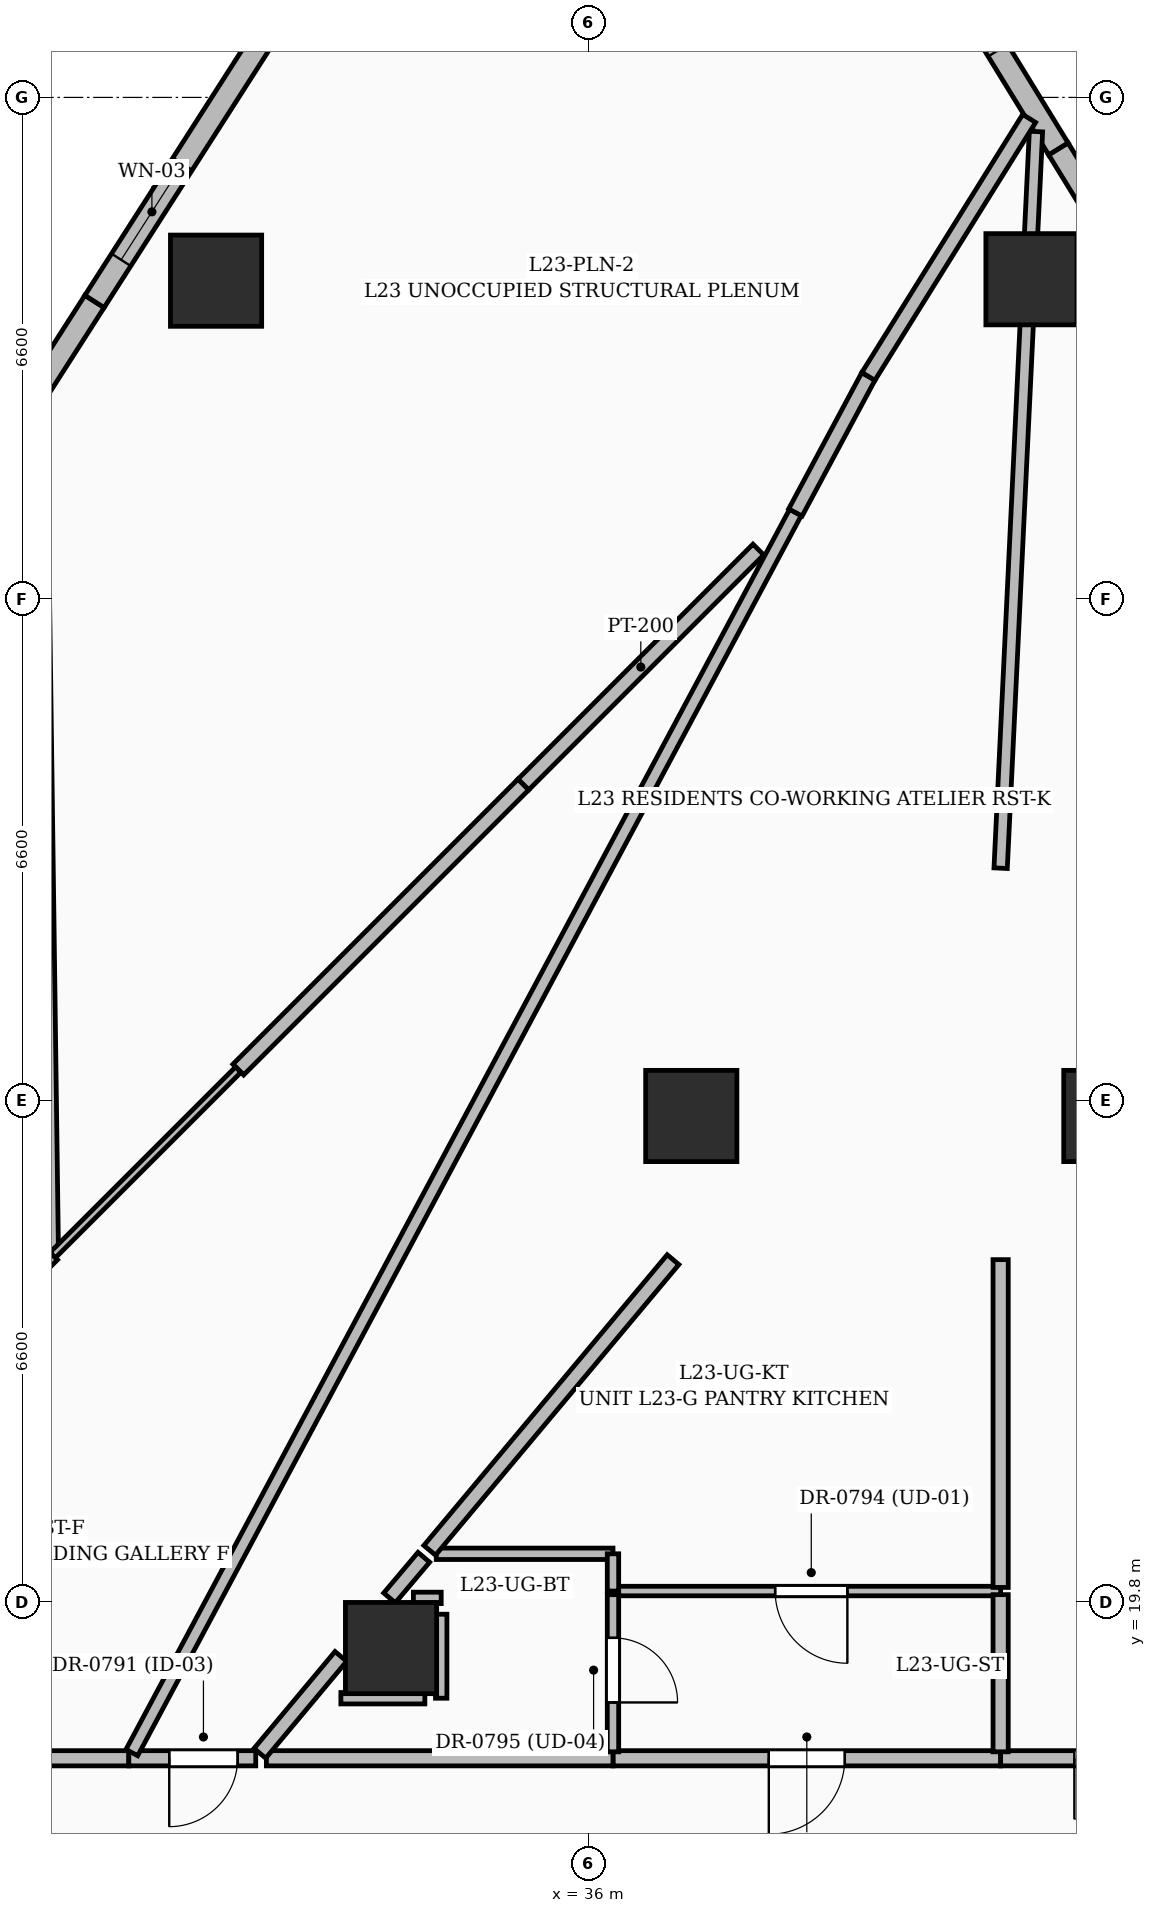
"""IFC4 building model, lengths in metres.
Left out: names, types, materials, properties, quantities, classifications, styles, units other than length and angle.
Written with IfcOpenShell. Run it as: python <this file> out.ifc"""

import sys

from ifc_helpers import new_model, si_unit, direction, frame, frame_2d, origin, origin_2d, place, context, subcontext, project, spatial, rectangle, extrude, element, fill, save


model = new_model("IFC4")
c1 = context("Model", 3, precision=1e-05, world=origin(), true_north=direction((0.0, 1.0)))
c2 = subcontext(c1, "Body", "Model", "MODEL_VIEW")
j1 = project(units=[si_unit("LENGTHUNIT", "METRE"), si_unit("PLANEANGLEUNIT", "RADIAN")], contexts=[c1])
p1 = place(None, origin())
s1 = spatial("IfcSite", under=j1, at=p1, CompositionType="ELEMENT")
p2 = place(p1, origin())
s2 = spatial("IfcBuilding", under=s1, at=p2, CompositionType="ELEMENT")
p3 = place(p2, frame((0.0, 0.0, 93.0)))
s3 = spatial("IfcBuildingStorey", under=s2, at=p3, CompositionType="ELEMENT", Elevation=93.0)
for number, where, z_axis, x_axis in (
    (1, (42.85, 26.2, 0.0), (0.0, 0.0, 1.0), (1.0, 0.0, 0.0)),
    (2, (37.35, 26.2, 0.0), (0.0, 0.0, 1.0), (1.0, 0.0, 0.0)),
    (3, (33.4, 19.2, 0.0), (0.0, 0.0, 1.0), (1.0, 0.0, 0.0)),
    (4, (41.826, 37.208, 0.0), (0.0, 0.0, 1.0), (1.0, 0.0, 0.0)),
    (5, (31.098, 37.189, 0.0), (0.0, 0.0, 1.0), (1.0, 0.0, 0.0)),
):
    element("IfcColumn", number, at=place(p3, frame(where, z_axis=z_axis, x_axis=x_axis)), inside=s3, PredefinedType="COLUMN", context=c2, shape_type="SweptSolid", body=[
        extrude(rectangle(XDim=1.2, YDim=1.2, at=origin_2d()), origin(), (0.0, 0.0, 1.0), 3.6),
    ])
p4 = place(p3, frame((25.202, 30.21, 0.0), z_axis=(0.0, 0.0, 1.0), x_axis=(0.53945551692, 0.842014100395, 0.0)))
e6 = element("IfcWall", 6, at=p4, inside=s3, PredefinedType="SOLIDWALL", context=c2, shape_type="SweptSolid", body=[
    extrude(rectangle(XDim=7.964, YDim=0.3, at=frame_2d((3.982, 0.0))), origin(), (0.0, 0.0, 1.0), 3.35),
])
p5 = place(p4, frame((2.35, 0.0, 0.55)))
e7 = element("IfcOpeningElement", 7, at=p5, cuts=e6, PredefinedType="OPENING", context=c2, shape_type="SweptSolid", body=[
    extrude(rectangle(XDim=1.6, YDim=2.2, at=frame_2d((0.8, 1.1))), frame((0.0, 0.16, 0.0), z_axis=(0.0, -1.0, 0.0), x_axis=(1.0, 0.0, 0.0)), (0.0, 0.0, 1.0), 0.32),
])
p6 = place(p3, frame((29.499, 36.916, 0.0), z_axis=(0.0, 0.0, 1.0), x_axis=(0.539433782812, 0.842028024451, 0.0)))
e8 = element("IfcWall", 8, at=p6, inside=s3, PredefinedType="SOLIDWALL", context=c2, shape_type="SweptSolid", body=[
    extrude(rectangle(XDim=7.964, YDim=0.3, at=frame_2d((3.982, 0.0))), origin(), (0.0, 0.0, 1.0), 3.35),
])
p7 = place(p6, frame((0.65, 0.0, 0.6)))
e9 = element("IfcOpeningElement", 9, at=p7, cuts=e8, PredefinedType="OPENING", context=c2, shape_type="SweptSolid", body=[
    extrude(rectangle(XDim=1.5, YDim=2.1, at=frame_2d((0.75, 1.05))), frame((0.0, 0.16, 0.0), z_axis=(0.0, -1.0, 0.0), x_axis=(1.0, 0.0, 0.0)), (0.0, 0.0, 1.0), 0.32),
])
p8 = place(p6, frame((4.65, 0.0, 0.6)))
e10 = element("IfcOpeningElement", 10, at=p8, cuts=e8, PredefinedType="OPENING", context=c2, shape_type="SweptSolid", body=[
    extrude(rectangle(XDim=1.5, YDim=2.1, at=frame_2d((0.75, 1.05))), frame((0.0, 0.16, 0.0), z_axis=(0.0, -1.0, 0.0), x_axis=(1.0, 0.0, 0.0)), (0.0, 0.0, 1.0), 0.32),
])
p9 = place(p3, frame((39.54, 43.217, 0.0), z_axis=(0.0, 0.0, 1.0), x_axis=(0.52373802156, -0.851879383935, 0.0)))
e11 = element("IfcWall", 11, at=p9, inside=s3, PredefinedType="SOLIDWALL", context=c2, shape_type="SweptSolid", body=[
    extrude(rectangle(XDim=5.042, YDim=0.3, at=frame_2d((2.521, 0.0))), origin(), (0.0, 0.0, 1.0), 3.35),
])
p10 = place(p9, frame((1.92, 0.0, 0.55)))
e12 = element("IfcOpeningElement", 12, at=p10, cuts=e11, PredefinedType="OPENING", context=c2, shape_type="SweptSolid", body=[
    extrude(rectangle(XDim=1.6, YDim=2.2, at=frame_2d((0.8, 1.1))), frame((0.0, 0.16, 0.0), z_axis=(0.0, -1.0, 0.0), x_axis=(1.0, 0.0, 0.0)), (0.0, 0.0, 1.0), 0.32),
])
p11 = place(p3, frame((42.181, 38.922, 0.0), z_axis=(0.0, 0.0, 1.0), x_axis=(0.523678708762, -0.851915846777, 0.0)))
e13 = element("IfcWall", 13, at=p11, inside=s3, PredefinedType="SOLIDWALL", context=c2, shape_type="SweptSolid", body=[
    extrude(rectangle(XDim=5.596, YDim=0.3, at=frame_2d((2.798, 0.0))), origin(), (0.0, 0.0, 1.0), 3.35),
])
p12 = place(p11, frame((2.025, 0.0, 0.6)))
e14 = element("IfcOpeningElement", 14, at=p12, cuts=e13, PredefinedType="OPENING", context=c2, shape_type="SweptSolid", body=[
    extrude(rectangle(XDim=1.5, YDim=2.1, at=frame_2d((0.75, 1.05))), frame((0.0, 0.16, 0.0), z_axis=(0.0, -1.0, 0.0), x_axis=(1.0, 0.0, 0.0)), (0.0, 0.0, 1.0), 0.32),
])
p13 = place(p3, frame((29.95, 17.75, 0.0), z_axis=(0.0, 0.0, 1.0), x_axis=(-1.0, 0.0, 0.0)))
e15 = element("IfcWall", 15, at=p13, inside=s3, PredefinedType="PARTITIONING", context=c2, shape_type="SweptSolid", body=[
    extrude(rectangle(XDim=7.465, YDim=0.2, at=frame_2d((3.732, 0.0))), origin(), (0.0, 0.0, 1.0), 2.345),
])
p14 = place(p13, frame((3.01, 0.0, 0.0)))
e16 = element("IfcOpeningElement", 16, at=p14, cuts=e15, PredefinedType="OPENING", context=c2, shape_type="SweptSolid", body=[
    extrude(rectangle(XDim=1.6, YDim=2.3, at=frame_2d((0.8, 1.15))), frame((0.0, 0.11, 0.0), z_axis=(0.0, -1.0, 0.0), x_axis=(1.0, 0.0, 0.0)), (0.0, 0.0, 1.0), 0.22),
])
p15 = place(p3, frame((41.42, 17.75, 0.0), z_axis=(0.0, 0.0, 1.0), x_axis=(-1.0, 0.0, 0.0)))
e17 = element("IfcWall", 17, at=p15, inside=s3, PredefinedType="PARTITIONING", context=c2, shape_type="SweptSolid", body=[
    extrude(rectangle(XDim=5.1, YDim=0.2, at=frame_2d((2.55, 0.0))), origin(), (0.0, 0.0, 1.0), 3.35),
])
p16 = place(p15, frame((2.05, 0.0, 0.0)))
e18 = element("IfcOpeningElement", 18, at=p16, cuts=e17, PredefinedType="OPENING", context=c2, shape_type="SweptSolid", body=[
    extrude(rectangle(XDim=1.0, YDim=2.2, at=frame_2d((0.5, 1.1))), frame((0.0, 0.11, 0.0), z_axis=(0.0, -1.0, 0.0), x_axis=(1.0, 0.0, 0.0)), (0.0, 0.0, 1.0), 0.22),
])
p17 = place(p3, frame((36.32, 17.75, 0.0), z_axis=(0.0, 0.0, 1.0), x_axis=(-1.0, 0.0, 0.0)))
e19 = element("IfcWall", 19, at=p17, inside=s3, PredefinedType="PARTITIONING", context=c2, shape_type="SweptSolid", body=[
    extrude(rectangle(XDim=4.56, YDim=0.2, at=frame_2d((2.28, 0.0))), origin(), (0.0, 0.0, 1.0), 2.309),
])
p18 = place(p3, frame((31.62, 17.75, 0.0), z_axis=(0.0, 0.0, 1.0), x_axis=(-1.0, 0.0, 0.0)))
e20 = element("IfcWall", 20, at=p18, inside=s3, PredefinedType="PARTITIONING", context=c2, shape_type="SweptSolid", body=[
    extrude(rectangle(XDim=1.67, YDim=0.2, at=frame_2d((0.835, 0.0))), origin(), (0.0, 0.0, 1.0), 3.35),
])
p19 = place(p18, frame((0.238, 0.0, 0.0)))
e21 = element("IfcOpeningElement", 21, at=p19, cuts=e20, PredefinedType="OPENING", context=c2, shape_type="SweptSolid", body=[
    extrude(rectangle(XDim=0.9, YDim=2.1, at=frame_2d((0.45, 1.05))), frame((0.0, 0.11, 0.0), z_axis=(0.0, -1.0, 0.0), x_axis=(1.0, 0.0, 0.0)), (0.0, 0.0, 1.0), 0.22),
])
p20 = place(p3, frame((44.96, 17.75, 0.0), z_axis=(0.0, 0.0, 1.0), x_axis=(-1.0, 0.0, 0.0)))
e22 = element("IfcWall", 22, at=p20, inside=s3, PredefinedType="PARTITIONING", context=c2, shape_type="SweptSolid", body=[
    extrude(rectangle(XDim=3.54, YDim=0.2, at=frame_2d((1.77, 0.0))), origin(), (0.0, 0.0, 1.0), 3.35),
])
p21 = place(p20, frame((0.97, 0.0, 0.0)))
e23 = element("IfcOpeningElement", 23, at=p21, cuts=e22, PredefinedType="OPENING", context=c2, shape_type="SweptSolid", body=[
    extrude(rectangle(XDim=1.6, YDim=2.3, at=frame_2d((0.8, 1.15))), frame((0.0, 0.11, 0.0), z_axis=(0.0, -1.0, 0.0), x_axis=(1.0, 0.0, 0.0)), (0.0, 0.0, 1.0), 0.22),
])
p22 = place(p3, frame((22.39, 17.81, 0.0), z_axis=(0.0, 0.0, 1.0), x_axis=(0.707093622896, 0.707119939232, 0.0)))
e24 = element("IfcWall", 24, at=p22, inside=s3, PredefinedType="PARTITIONING", context=c2, shape_type="SweptSolid", body=[
    extrude(rectangle(XDim=9.277, YDim=0.175, at=frame_2d((4.639, 0.0))), origin(), (0.0, 0.0, 1.0), 2.345),
])
p23 = place(p3, frame((28.949, 24.442, 0.0), z_axis=(0.0, 0.0, 1.0), x_axis=(-0.013598057178, 0.999907542146, 0.0)))
e25 = element("IfcWall", 25, at=p23, inside=s3, PredefinedType="PARTITIONING", context=c2, shape_type="SweptSolid", body=[
    extrude(rectangle(XDim=11.114, YDim=0.15, at=frame_2d((5.557, 0.0))), origin(), (0.0, 0.0, 1.0), 2.37),
])
p24 = place(p3, frame((29.99, 17.825, 0.0), z_axis=(0.0, 0.0, 1.0), x_axis=(0.471794438595, 0.881708573005, 0.0)))
e26 = element("IfcWall", 26, at=p24, inside=s3, PredefinedType="PARTITIONING", context=c2, shape_type="SweptSolid", body=[
    extrude(rectangle(XDim=18.504, YDim=0.175, at=frame_2d((9.252, 0.0))), origin(), (0.0, 0.0, 1.0), 2.345),
])
p25 = place(p3, frame((38.232, 33.652, 0.0), z_axis=(0.0, 0.0, 1.0), x_axis=(-0.707134695316, -0.707078865955, 0.0)))
e27 = element("IfcWall", 27, at=p25, inside=s3, PredefinedType="PARTITIONING", context=c2, shape_type="SweptSolid", body=[
    extrude(rectangle(XDim=4.373, YDim=0.2, at=frame_2d((2.187, 0.0))), origin(), (0.0, 0.0, 1.0), 2.787),
])
p26 = place(p3, frame((35.14, 30.56, 0.0), z_axis=(0.0, 0.0, 1.0), x_axis=(-0.707106781187, -0.707106781187, 0.0)))
e28 = element("IfcWall", 28, at=p26, inside=s3, PredefinedType="PARTITIONING", context=c2, shape_type="SweptSolid", body=[
    extrude(rectangle(XDim=5.303, YDim=0.2, at=frame_2d((2.652, 0.0))), origin(), (0.0, 0.0, 1.0), 2.345),
])
p27 = place(p3, frame((41.42, 19.95, 0.0), z_axis=(0.0, 0.0, 1.0), x_axis=(-1.0, 0.0, 0.0)))
e29 = element("IfcWall", 29, at=p27, inside=s3, PredefinedType="PARTITIONING", context=c2, shape_type="SweptSolid", body=[
    extrude(rectangle(XDim=5.1, YDim=0.125, at=frame_2d((2.55, 0.0))), origin(), (0.0, 0.0, 1.0), 3.35),
])
p28 = place(p27, frame((2.016, 0.0, 0.0)))
e30 = element("IfcOpeningElement", 30, at=p28, cuts=e29, PredefinedType="OPENING", context=c2, shape_type="SweptSolid", body=[
    extrude(rectangle(XDim=0.95, YDim=2.2, at=frame_2d((0.475, 1.1))), frame((0.0, 0.072, 0.0), z_axis=(0.0, -1.0, 0.0), x_axis=(1.0, 0.0, 0.0)), (0.0, 0.0, 1.0), 0.145),
])
p29 = place(p3, frame((36.32, 19.903, 0.0), z_axis=(0.0, 0.0, 1.0), x_axis=(0.0, -1.0, 0.0)))
e31 = element("IfcWall", 31, at=p29, inside=s3, PredefinedType="PARTITIONING", context=c2, shape_type="SweptSolid", body=[
    extrude(rectangle(XDim=2.068, YDim=0.15, at=frame_2d((1.034, 0.0))), origin(), (0.0, 0.0, 1.0), 3.35),
])
p30 = place(p29, frame((0.568, 0.0, 0.0)))
e32 = element("IfcOpeningElement", 32, at=p30, cuts=e31, PredefinedType="OPENING", context=c2, shape_type="SweptSolid", body=[
    extrude(rectangle(XDim=0.85, YDim=2.1, at=frame_2d((0.425, 1.05))), frame((0.0, 0.085, 0.0), z_axis=(0.0, -1.0, 0.0), x_axis=(1.0, 0.0, 0.0)), (0.0, 0.0, 1.0), 0.17),
])
p31 = place(p3, frame((41.42, 17.835, 0.0), z_axis=(0.0, 0.0, 1.0), x_axis=(0.0, 1.0, 0.0)))
e33 = element("IfcWall", 33, at=p31, inside=s3, PredefinedType="PARTITIONING", context=c2, shape_type="SweptSolid", body=[
    extrude(rectangle(XDim=2.068, YDim=0.2, at=frame_2d((1.034, 0.0))), origin(), (0.0, 0.0, 1.0), 3.35),
])
p32 = place(p3, frame((33.995, 20.44, 0.0), z_axis=(0.0, 0.0, 1.0), x_axis=(1.0, 0.0, 0.0)))
e34 = element("IfcWall", 34, at=p32, inside=s3, PredefinedType="PARTITIONING", context=c2, shape_type="SweptSolid", body=[
    extrude(rectangle(XDim=2.325, YDim=0.15, at=frame_2d((1.163, 0.0))), origin(), (0.0, 0.0, 1.0), 2.309),
])
p33 = place(p3, frame((36.32, 20.44, 0.0), z_axis=(0.0, 0.0, 1.0), x_axis=(0.0, -1.0, 0.0)))
e35 = element("IfcWall", 35, at=p33, inside=s3, PredefinedType="PARTITIONING", context=c2, shape_type="SweptSolid", body=[
    extrude(rectangle(XDim=0.49, YDim=0.15, at=frame_2d((0.245, 0.0))), origin(), (0.0, 0.0, 1.0), 3.35),
])
p34 = place(p3, frame((37.11, 24.31, 0.0), z_axis=(0.0, 0.0, 1.0), x_axis=(-0.641959412344, -0.766738620981, 0.0)))
e36 = element("IfcWall", 36, at=p34, inside=s3, PredefinedType="PARTITIONING", context=c2, shape_type="SweptSolid", body=[
    extrude(rectangle(XDim=4.987, YDim=0.2, at=frame_2d((2.494, 0.0))), origin(), (0.0, 0.0, 1.0), 2.309),
])
p35 = place(p3, frame((41.42, 19.998, 0.0), z_axis=(0.0, 0.0, 1.0), x_axis=(0.0, 1.0, 0.0)))
e37 = element("IfcWall", 37, at=p35, inside=s3, PredefinedType="PARTITIONING", context=c2, shape_type="SweptSolid", body=[
    extrude(rectangle(XDim=4.312, YDim=0.2, at=frame_2d((2.156, 0.0))), origin(), (0.0, 0.0, 1.0), 3.35),
])
p36 = place(p3, frame((32.74, 19.09, 0.0), z_axis=(0.0, 0.0, 1.0), x_axis=(-0.641253321663, -0.767329249707, 0.0)))
e38 = element("IfcWall", 38, at=p36, inside=s3, PredefinedType="PARTITIONING", context=c2, shape_type="SweptSolid", body=[
    extrude(rectangle(XDim=1.661, YDim=0.2, at=frame_2d((0.831, 0.0))), origin(), (0.0, 0.0, 1.0), 3.35),
])
p37 = place(p3, frame((33.831, 20.394, 0.0), z_axis=(0.0, 0.0, 1.0), x_axis=(-0.645457004141, -0.763796606306, 0.0)))
e39 = element("IfcWall", 39, at=p37, inside=s3, PredefinedType="PARTITIONING", context=c2, shape_type="SweptSolid", body=[
    extrude(rectangle(XDim=0.699, YDim=0.2, at=frame_2d((0.35, 0.0))), origin(), (0.0, 0.0, 1.0), 2.309),
])
p38 = place(p3, frame((41.42, 29.46, 0.0), z_axis=(0.0, 0.0, 1.0), x_axis=(0.047936966321, 0.998850362797, 0.0)))
e40 = element("IfcWall", 40, at=p38, inside=s3, PredefinedType="PARTITIONING", context=c2, shape_type="SweptSolid", body=[
    extrude(rectangle(XDim=9.702, YDim=0.175, at=frame_2d((4.851, 0.0))), origin(), (0.0, 0.0, 1.0), 2.345),
])
p39 = place(p3, frame((39.68, 35.93, 0.0), z_axis=(0.0, 0.0, 1.0), x_axis=(-0.472608279445, -0.881272610603, 0.0)))
e41 = element("IfcWall", 41, at=p39, inside=s3, PredefinedType="PARTITIONING", context=c2, shape_type="SweptSolid", body=[
    extrude(rectangle(XDim=2.031, YDim=0.2, at=frame_2d((1.016, 0.0))), origin(), (0.0, 0.0, 1.0), 3.35),
])
p40 = place(p3, frame((41.795, 39.324, 0.0), z_axis=(0.0, 0.0, 1.0), x_axis=(-0.528868032501, -0.848704073396, 0.0)))
e42 = element("IfcWall", 42, at=p40, inside=s3, PredefinedType="PARTITIONING", context=c2, shape_type="SweptSolid", body=[
    extrude(rectangle(XDim=3.999, YDim=0.2, at=frame_2d((2.0, 0.0))), origin(), (0.0, 0.0, 1.0), 2.37),
])
p41 = place(p3, frame((31.39, 26.81, 0.0), z_axis=(0.0, 0.0, 1.0), x_axis=(-0.707106781187, -0.707106781187, 0.0)))
e43 = element("IfcWall", 43, at=p41, inside=s3, PredefinedType="PARTITIONING", context=c2, shape_type="SweptSolid", body=[
    extrude(rectangle(XDim=3.451, YDim=0.1, at=frame_2d((1.725, 0.0))), origin(), (0.0, 0.0, 1.0), 2.345),
])
p42 = place(p3, frame((33.694, 19.86, 0.0), z_axis=(0.0, 0.0, 1.0), x_axis=(1.0, 0.0, 0.0)))
e44 = element("IfcWall", 44, at=p42, inside=s3, PredefinedType="PARTITIONING", context=c2, shape_type="SweptSolid", body=[
    extrude(rectangle(XDim=0.366, YDim=0.15, at=frame_2d((0.183, 0.0))), origin(), (0.0, 0.0, 1.0), 2.309),
])
p43 = place(p3, frame((34.06, 19.645, 0.0), z_axis=(0.0, 0.0, 1.0), x_axis=(0.0, -1.0, 0.0)))
e45 = element("IfcWall", 45, at=p43, inside=s3, PredefinedType="PARTITIONING", context=c2, shape_type="SweptSolid", body=[
    extrude(rectangle(XDim=1.105, YDim=0.15, at=frame_2d((0.552, 0.0))), origin(), (0.0, 0.0, 1.0), 3.35),
])
p44 = place(p3, frame((33.845, 18.54, 0.0), z_axis=(0.0, 0.0, 1.0), x_axis=(-1.0, 0.0, 0.0)))
e46 = element("IfcWall", 46, at=p44, inside=s3, PredefinedType="PARTITIONING", context=c2, shape_type="SweptSolid", body=[
    extrude(rectangle(XDim=1.105, YDim=0.15, at=frame_2d((0.552, 0.0))), origin(), (0.0, 0.0, 1.0), 2.309),
])
p45 = place(p7, origin())
e47 = element("IfcWindow", 47, at=p45, inside=s3, PartitioningType="SINGLE_PANEL", PredefinedType="WINDOW", context=c2, shape_type="SweptSolid", body=[
    extrude(rectangle(XDim=1.5, YDim=2.1, at=frame_2d((0.75, 1.05))), frame((0.0, 0.03, 0.0), z_axis=(0.0, -1.0, 0.0), x_axis=(1.0, 0.0, 0.0)), (0.0, 0.0, 1.0), 0.06),
])
fill(e9, e47)
p46 = place(p19, origin())
e48 = element("IfcDoor", 48, at=p46, inside=s3, OperationType="SINGLE_SWING_RIGHT", PredefinedType="DOOR", context=c2, shape_type="SweptSolid", body=[
    extrude(rectangle(XDim=0.9, YDim=2.1, at=frame_2d((0.45, 1.05))), frame((0.0, 0.025, 0.0), z_axis=(0.0, -1.0, 0.0), x_axis=(1.0, 0.0, 0.0)), (0.0, 0.0, 1.0), 0.05),
])
fill(e21, e48)
p47 = place(p21, origin())
e49 = element("IfcDoor", 49, at=p47, inside=s3, OperationType="DOUBLE_DOOR_SINGLE_SWING", PredefinedType="DOOR", context=c2, shape_type="SweptSolid", body=[
    extrude(rectangle(XDim=1.6, YDim=2.3, at=frame_2d((0.8, 1.15))), frame((0.0, 0.025, 0.0), z_axis=(0.0, -1.0, 0.0), x_axis=(1.0, 0.0, 0.0)), (0.0, 0.0, 1.0), 0.05),
])
fill(e23, e49)
p48 = place(p16, origin())
e50 = element("IfcDoor", 50, at=p48, inside=s3, OperationType="SINGLE_SWING_RIGHT", PredefinedType="DOOR", context=c2, shape_type="SweptSolid", body=[
    extrude(rectangle(XDim=1.0, YDim=2.2, at=frame_2d((0.5, 1.1))), frame((0.0, 0.025, 0.0), z_axis=(0.0, -1.0, 0.0), x_axis=(1.0, 0.0, 0.0)), (0.0, 0.0, 1.0), 0.05),
])
fill(e18, e50)
p49 = place(p28, origin())
e51 = element("IfcDoor", 51, at=p49, inside=s3, OperationType="SINGLE_SWING_LEFT", PredefinedType="DOOR", context=c2, shape_type="SweptSolid", body=[
    extrude(rectangle(XDim=0.95, YDim=2.2, at=frame_2d((0.475, 1.1))), frame((0.0, 0.025, 0.0), z_axis=(0.0, -1.0, 0.0), x_axis=(1.0, 0.0, 0.0)), (0.0, 0.0, 1.0), 0.05),
])
fill(e30, e51)
p50 = place(p30, origin())
e52 = element("IfcDoor", 52, at=p50, inside=s3, OperationType="SINGLE_SWING_RIGHT", PredefinedType="DOOR", context=c2, shape_type="SweptSolid", body=[
    extrude(rectangle(XDim=0.85, YDim=2.1, at=frame_2d((0.425, 1.05))), frame((0.0, 0.025, 0.0), z_axis=(0.0, -1.0, 0.0), x_axis=(1.0, 0.0, 0.0)), (0.0, 0.0, 1.0), 0.05),
])
fill(e32, e52)
save(model, sys.argv[1])
